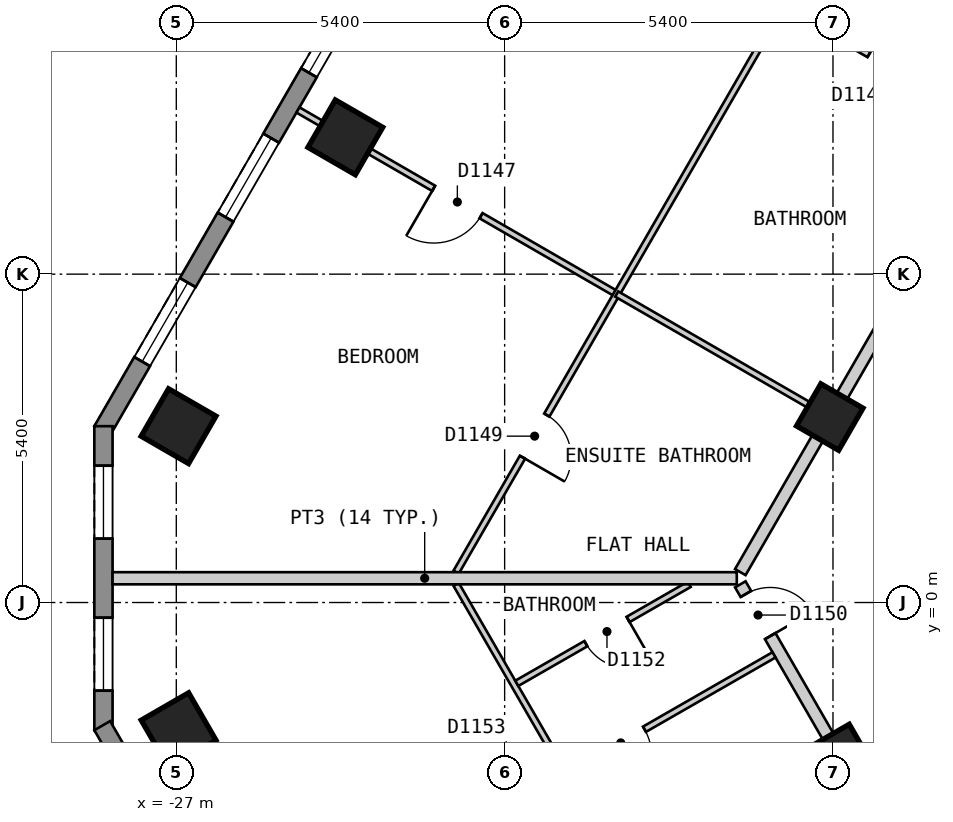
"""IFC4 building model, lengths in metres.
Left out: names, types, materials, properties, quantities, classifications, styles, units other than length and angle.
Written with IfcOpenShell. Run it as: python <this file> out.ifc"""

import sys

from ifc_helpers import new_model, si_unit, direction, frame, frame_2d, origin, origin_2d, place, context, subcontext, project, spatial, polyline, rectangle, outline, extrude, element, fill, save


model = new_model("IFC4")
c1 = context("Model", 3, precision=1e-05, world=origin(), true_north=direction((0.0, 1.0)))
c2 = subcontext(c1, "Body", "Model", "MODEL_VIEW")
j1 = project(units=[si_unit("LENGTHUNIT", "METRE"), si_unit("PLANEANGLEUNIT", "RADIAN")], contexts=[c1])
p1 = place(None, origin())
s1 = spatial("IfcSite", under=j1, at=p1, CompositionType="ELEMENT")
p2 = place(p1, origin())
s2 = spatial("IfcBuilding", under=s1, at=p2, CompositionType="ELEMENT")
p3 = place(p2, frame((0.0, 0.0, 138.6)))
s3 = spatial("IfcBuildingStorey", under=s2, at=p3, CompositionType="ELEMENT", Elevation=138.6)
for number, where, z_axis, x_axis in (
    (1, (-24.22, 7.65, 0.0), (0.0, 0.0, 1.0), (-0.5, -0.866, 0.0)),
    (2, (-26.963, 2.9, 0.0), (0.0, 0.0, 1.0), (-0.5, -0.866, 0.0)),
    (3, (-26.962, -2.1, 0.0), (0.0, 0.0, 1.0), (0.5, -0.866, 0.0)),
):
    element("IfcColumn", number, at=place(p3, frame(where, z_axis=z_axis, x_axis=x_axis)), inside=s3, PredefinedType="COLUMN", context=c2, shape_type="SweptSolid", body=[
        extrude(rectangle(XDim=0.9, YDim=0.9, at=origin_2d()), origin(), (0.0, 0.0, 1.0), 3.0),
    ])
for number, where, z_axis, x_axis in (
    (4, (-16.079, -2.549, 0.0), (0.0, 0.0, 1.0), (0.5, -0.866, 0.0)),
    (5, (-16.253, 3.05, 0.0), (0.0, 0.0, 1.0), (-0.5, -0.866, 0.0)),
):
    element("IfcColumn", number, at=place(p3, frame(where, z_axis=z_axis, x_axis=x_axis)), inside=s3, PredefinedType="COLUMN", context=c2, shape_type="SweptSolid", body=[
        extrude(rectangle(XDim=0.8, YDim=0.8, at=origin_2d()), origin(), (0.0, 0.0, 1.0), 3.0),
    ])
p4 = place(p3, frame((-16.555, 23.025, 0.0), z_axis=(0.0, 0.0, 1.0), x_axis=(-0.500020536353, -0.866013546791, 0.0)))
e6 = element("IfcWall", 6, at=p4, inside=s3, PredefinedType="SOLIDWALL", context=c2, shape_type="SweptSolid", body=[
    extrude(outline(polyline([(0.0, -0.15), (23.325, -0.15), (23.245, 0.15), (0.08, 0.15), (0.0, -0.15)])), origin(), (0.0, 0.0, 1.0), 2.7),
])
p5 = place(p4, frame((1.314, 0.0, 0.15)))
e7 = element("IfcOpeningElement", 7, at=p5, cuts=e6, PredefinedType="OPENING", context=c2, shape_type="SweptSolid", body=[
    extrude(rectangle(XDim=1.5, YDim=2.1, at=frame_2d((0.75, 1.05))), frame((0.0, 0.16, 0.0), z_axis=(0.0, -1.0, 0.0), x_axis=(1.0, 0.0, 0.0)), (0.0, 0.0, 1.0), 0.32),
])
p6 = place(p4, frame((4.056, 0.0, 0.15)))
e8 = element("IfcOpeningElement", 8, at=p6, cuts=e6, PredefinedType="OPENING", context=c2, shape_type="SweptSolid", body=[
    extrude(rectangle(XDim=1.5, YDim=2.1, at=frame_2d((0.75, 1.05))), frame((0.0, 0.16, 0.0), z_axis=(0.0, -1.0, 0.0), x_axis=(1.0, 0.0, 0.0)), (0.0, 0.0, 1.0), 0.32),
])
p7 = place(p4, frame((6.799, 0.0, 0.15)))
e9 = element("IfcOpeningElement", 9, at=p7, cuts=e6, PredefinedType="OPENING", context=c2, shape_type="SweptSolid", body=[
    extrude(rectangle(XDim=1.5, YDim=2.1, at=frame_2d((0.75, 1.05))), frame((0.0, 0.16, 0.0), z_axis=(0.0, -1.0, 0.0), x_axis=(1.0, 0.0, 0.0)), (0.0, 0.0, 1.0), 0.32),
])
p8 = place(p4, frame((9.541, 0.0, 0.15)))
e10 = element("IfcOpeningElement", 10, at=p8, cuts=e6, PredefinedType="OPENING", context=c2, shape_type="SweptSolid", body=[
    extrude(rectangle(XDim=1.5, YDim=2.1, at=frame_2d((0.75, 1.05))), frame((0.0, 0.16, 0.0), z_axis=(0.0, -1.0, 0.0), x_axis=(1.0, 0.0, 0.0)), (0.0, 0.0, 1.0), 0.32),
])
p9 = place(p4, frame((12.285, 0.0, 0.15)))
e11 = element("IfcOpeningElement", 11, at=p9, cuts=e6, PredefinedType="OPENING", context=c2, shape_type="SweptSolid", body=[
    extrude(rectangle(XDim=1.5, YDim=2.1, at=frame_2d((0.75, 1.05))), frame((0.0, 0.16, 0.0), z_axis=(0.0, -1.0, 0.0), x_axis=(1.0, 0.0, 0.0)), (0.0, 0.0, 1.0), 0.32),
])
p10 = place(p4, frame((15.027, 0.0, 0.15)))
e12 = element("IfcOpeningElement", 12, at=p10, cuts=e6, PredefinedType="OPENING", context=c2, shape_type="SweptSolid", body=[
    extrude(rectangle(XDim=1.5, YDim=2.1, at=frame_2d((0.75, 1.05))), frame((0.0, 0.16, 0.0), z_axis=(0.0, -1.0, 0.0), x_axis=(1.0, 0.0, 0.0)), (0.0, 0.0, 1.0), 0.32),
])
p11 = place(p4, frame((17.769, 0.0, 0.15)))
e13 = element("IfcOpeningElement", 13, at=p11, cuts=e6, PredefinedType="OPENING", context=c2, shape_type="SweptSolid", body=[
    extrude(rectangle(XDim=1.5, YDim=2.1, at=frame_2d((0.75, 1.05))), frame((0.0, 0.16, 0.0), z_axis=(0.0, -1.0, 0.0), x_axis=(1.0, 0.0, 0.0)), (0.0, 0.0, 1.0), 0.32),
])
p12 = place(p4, frame((20.512, 0.0, 0.15)))
e14 = element("IfcOpeningElement", 14, at=p12, cuts=e6, PredefinedType="OPENING", context=c2, shape_type="SweptSolid", body=[
    extrude(rectangle(XDim=1.5, YDim=2.1, at=frame_2d((0.75, 1.05))), frame((0.0, 0.16, 0.0), z_axis=(0.0, -1.0, 0.0), x_axis=(1.0, 0.0, 0.0)), (0.0, 0.0, 1.0), 0.32),
])
p13 = place(p3, frame((-28.198, 2.9, 0.0), z_axis=(0.0, 0.0, 1.0), x_axis=(0.0, -1.0, 0.0)))
e15 = element("IfcWall", 15, at=p13, inside=s3, PredefinedType="SOLIDWALL", context=c2, shape_type="SweptSolid", body=[
    extrude(outline(polyline([(0.0, -0.15), (5.0, -0.15), (4.92, 0.15), (0.08, 0.15), (0.0, -0.15)])), origin(), (0.0, 0.0, 1.0), 2.7),
])
p14 = place(p13, frame((0.65, 0.0, 0.15)))
e16 = element("IfcOpeningElement", 16, at=p14, cuts=e15, PredefinedType="OPENING", context=c2, shape_type="SweptSolid", body=[
    extrude(rectangle(XDim=1.2, YDim=2.1, at=frame_2d((0.6, 1.05))), frame((0.0, 0.16, 0.0), z_axis=(0.0, -1.0, 0.0), x_axis=(1.0, 0.0, 0.0)), (0.0, 0.0, 1.0), 0.32),
])
p15 = place(p13, frame((3.15, 0.0, 0.15)))
e17 = element("IfcOpeningElement", 17, at=p15, cuts=e15, PredefinedType="OPENING", context=c2, shape_type="SweptSolid", body=[
    extrude(rectangle(XDim=1.2, YDim=2.1, at=frame_2d((0.6, 1.05))), frame((0.0, 0.16, 0.0), z_axis=(0.0, -1.0, 0.0), x_axis=(1.0, 0.0, 0.0)), (0.0, 0.0, 1.0), 0.32),
])
p16 = place(p3, frame((-28.218, -2.025, 0.0), z_axis=(0.0, 0.0, 1.0), x_axis=(0.500017503135, -0.866015298109, 0.0)))
e18 = element("IfcWall", 18, at=p16, inside=s3, PredefinedType="SOLIDWALL", context=c2, shape_type="SweptSolid", body=[
    extrude(outline(polyline([(0.0, -0.15), (24.711, -0.15), (24.631, 0.15), (0.08, 0.15), (0.0, -0.15)])), origin(), (0.0, 0.0, 1.0), 2.7),
])
p17 = place(p16, frame((1.4, 0.0, 0.15)))
e19 = element("IfcOpeningElement", 19, at=p17, cuts=e18, PredefinedType="OPENING", context=c2, shape_type="SweptSolid", body=[
    extrude(rectangle(XDim=1.5, YDim=2.1, at=frame_2d((0.75, 1.05))), frame((0.0, 0.16, 0.0), z_axis=(0.0, -1.0, 0.0), x_axis=(1.0, 0.0, 0.0)), (0.0, 0.0, 1.0), 0.32),
])
p18 = place(p16, frame((4.316, 0.0, 0.15)))
e20 = element("IfcOpeningElement", 20, at=p18, cuts=e18, PredefinedType="OPENING", context=c2, shape_type="SweptSolid", body=[
    extrude(rectangle(XDim=1.5, YDim=2.1, at=frame_2d((0.75, 1.05))), frame((0.0, 0.16, 0.0), z_axis=(0.0, -1.0, 0.0), x_axis=(1.0, 0.0, 0.0)), (0.0, 0.0, 1.0), 0.32),
])
p19 = place(p16, frame((7.231, 0.0, 0.15)))
e21 = element("IfcOpeningElement", 21, at=p19, cuts=e18, PredefinedType="OPENING", context=c2, shape_type="SweptSolid", body=[
    extrude(rectangle(XDim=1.5, YDim=2.1, at=frame_2d((0.75, 1.05))), frame((0.0, 0.16, 0.0), z_axis=(0.0, -1.0, 0.0), x_axis=(1.0, 0.0, 0.0)), (0.0, 0.0, 1.0), 0.32),
])
p20 = place(p16, frame((10.147, 0.0, 0.15)))
e22 = element("IfcOpeningElement", 22, at=p20, cuts=e18, PredefinedType="OPENING", context=c2, shape_type="SweptSolid", body=[
    extrude(rectangle(XDim=1.5, YDim=2.1, at=frame_2d((0.75, 1.05))), frame((0.0, 0.16, 0.0), z_axis=(0.0, -1.0, 0.0), x_axis=(1.0, 0.0, 0.0)), (0.0, 0.0, 1.0), 0.32),
])
p21 = place(p16, frame((13.062, 0.0, 0.15)))
e23 = element("IfcOpeningElement", 23, at=p21, cuts=e18, PredefinedType="OPENING", context=c2, shape_type="SweptSolid", body=[
    extrude(rectangle(XDim=1.5, YDim=2.1, at=frame_2d((0.75, 1.05))), frame((0.0, 0.16, 0.0), z_axis=(0.0, -1.0, 0.0), x_axis=(1.0, 0.0, 0.0)), (0.0, 0.0, 1.0), 0.32),
])
p22 = place(p16, frame((15.977, 0.0, 0.15)))
e24 = element("IfcOpeningElement", 24, at=p22, cuts=e18, PredefinedType="OPENING", context=c2, shape_type="SweptSolid", body=[
    extrude(rectangle(XDim=1.5, YDim=2.1, at=frame_2d((0.75, 1.05))), frame((0.0, 0.16, 0.0), z_axis=(0.0, -1.0, 0.0), x_axis=(1.0, 0.0, 0.0)), (0.0, 0.0, 1.0), 0.32),
])
p23 = place(p16, frame((18.893, 0.0, 0.15)))
e25 = element("IfcOpeningElement", 25, at=p23, cuts=e18, PredefinedType="OPENING", context=c2, shape_type="SweptSolid", body=[
    extrude(rectangle(XDim=1.5, YDim=2.1, at=frame_2d((0.75, 1.05))), frame((0.0, 0.16, 0.0), z_axis=(0.0, -1.0, 0.0), x_axis=(1.0, 0.0, 0.0)), (0.0, 0.0, 1.0), 0.32),
])
p24 = place(p16, frame((21.809, 0.0, 0.15)))
e26 = element("IfcOpeningElement", 26, at=p24, cuts=e18, PredefinedType="OPENING", context=c2, shape_type="SweptSolid", body=[
    extrude(rectangle(XDim=1.5, YDim=2.1, at=frame_2d((0.75, 1.05))), frame((0.0, 0.16, 0.0), z_axis=(0.0, -1.0, 0.0), x_axis=(1.0, 0.0, 0.0)), (0.0, 0.0, 1.0), 0.32),
])
p25 = place(p3, frame((-17.724, 0.299, 0.0), z_axis=(0.0, 0.0, 1.0), x_axis=(0.499910220442, -0.866077231832, 0.0)))
e27 = element("IfcWall", 27, at=p25, inside=s3, PredefinedType="PARTITIONING", context=c2, shape_type="SweptSolid", body=[
    extrude(rectangle(XDim=3.189, YDim=0.2, at=frame_2d((1.594, 0.0))), origin(), (0.0, 0.0, 1.0), 2.7),
])
p26 = place(p25, frame((0.183, 0.0, 0.0)))
e28 = element("IfcOpeningElement", 28, at=p26, cuts=e27, PredefinedType="OPENING", context=c2, shape_type="SweptSolid", body=[
    extrude(rectangle(XDim=0.8, YDim=2.1, at=frame_2d((0.4, 1.05))), frame((0.0, 0.11, 0.0), z_axis=(0.0, -1.0, 0.0), x_axis=(1.0, 0.0, 0.0)), (0.0, 0.0, 1.0), 0.22),
])
p27 = place(p3, frame((-17.724, 0.5, 0.0), z_axis=(0.0, 0.0, 1.0), x_axis=(0.499992388462, 0.866029798263, 0.0)))
e29 = element("IfcWall", 29, at=p27, inside=s3, PredefinedType="PARTITIONING", context=c2, shape_type="SweptSolid", body=[
    extrude(rectangle(XDim=16.859, YDim=0.2, at=frame_2d((8.429, 0.0))), origin(), (0.0, 0.0, 1.0), 2.7),
])
p28 = place(p27, frame((10.672, 0.0, 0.0)))
e30 = element("IfcOpeningElement", 30, at=p28, cuts=e29, PredefinedType="OPENING", context=c2, shape_type="SweptSolid", body=[
    extrude(rectangle(XDim=1.0, YDim=2.1, at=frame_2d((0.5, 1.05))), frame((0.0, 0.11, 0.0), z_axis=(0.0, -1.0, 0.0), x_axis=(1.0, 0.0, 0.0)), (0.0, 0.0, 1.0), 0.22),
])
p29 = place(p3, frame((-22.398, 0.299, 0.0), z_axis=(0.0, 0.0, 1.0), x_axis=(0.50004249738, -0.86600086652, 0.0)))
e31 = element("IfcWall", 31, at=p29, inside=s3, PredefinedType="PARTITIONING", context=c2, shape_type="SweptSolid", body=[
    extrude(rectangle(XDim=3.236, YDim=0.1, at=frame_2d((1.618, 0.0))), origin(), (0.0, 0.0, 1.0), 2.7),
])
p30 = place(p3, frame((-24.999, 8.1, 0.0), z_axis=(0.0, 0.0, 1.0), x_axis=(0.865978029808, -0.500082045158, 0.0)))
e32 = element("IfcWall", 32, at=p30, inside=s3, PredefinedType="PARTITIONING", context=c2, shape_type="SweptSolid", body=[
    extrude(rectangle(XDim=6.053, YDim=0.1, at=frame_2d((3.027, 0.0))), origin(), (0.0, 0.0, 1.0), 2.7),
])
p31 = place(p30, frame((2.577, 0.0, 0.0)))
e33 = element("IfcOpeningElement", 33, at=p31, cuts=e32, PredefinedType="OPENING", context=c2, shape_type="SweptSolid", body=[
    extrude(rectangle(XDim=0.9, YDim=2.1, at=frame_2d((0.45, 1.05))), frame((0.0, 0.06, 0.0), z_axis=(0.0, -1.0, 0.0), x_axis=(1.0, 0.0, 0.0)), (0.0, 0.0, 1.0), 0.12),
])
p32 = place(p3, frame((-16.971, 9.798, 0.0), z_axis=(0.0, 0.0, 1.0), x_axis=(0.866087525071, -0.499892387336, 0.0)))
e34 = element("IfcWall", 34, at=p32, inside=s3, PredefinedType="PARTITIONING", context=c2, shape_type="SweptSolid", body=[
    extrude(rectangle(XDim=3.897, YDim=0.1, at=frame_2d((1.948, 0.0))), origin(), (0.0, 0.0, 1.0), 2.7),
])
p33 = place(p32, frame((1.574, 0.0, 0.0)))
e35 = element("IfcOpeningElement", 35, at=p33, cuts=e34, PredefinedType="OPENING", context=c2, shape_type="SweptSolid", body=[
    extrude(rectangle(XDim=0.8, YDim=2.1, at=frame_2d((0.4, 1.05))), frame((0.0, 0.06, 0.0), z_axis=(0.0, -1.0, 0.0), x_axis=(1.0, 0.0, 0.0)), (0.0, 0.0, 1.0), 0.12),
])
p34 = place(p3, frame((-22.398, 0.499, 0.0), z_axis=(0.0, 0.0, 1.0), x_axis=(0.499981561717, 0.866036048871, 0.0)))
e36 = element("IfcWall", 36, at=p34, inside=s3, PredefinedType="PARTITIONING", context=c2, shape_type="SweptSolid", body=[
    extrude(rectangle(XDim=21.532, YDim=0.1, at=frame_2d((10.766, 0.0))), origin(), (0.0, 0.0, 1.0), 2.7),
])
p35 = place(p34, frame((13.049, 0.0, 0.0)))
e37 = element("IfcOpeningElement", 37, at=p35, cuts=e36, PredefinedType="OPENING", context=c2, shape_type="SweptSolid", body=[
    extrude(rectangle(XDim=0.9, YDim=2.1, at=frame_2d((0.45, 1.05))), frame((0.0, 0.06, 0.0), z_axis=(0.0, -1.0, 0.0), x_axis=(1.0, 0.0, 0.0)), (0.0, 0.0, 1.0), 0.12),
])
p36 = place(p34, frame((2.183, 0.0, 0.0)))
e38 = element("IfcOpeningElement", 38, at=p36, cuts=e36, PredefinedType="OPENING", context=c2, shape_type="SweptSolid", body=[
    extrude(rectangle(XDim=0.8, YDim=2.1, at=frame_2d((0.4, 1.05))), frame((0.0, 0.06, 0.0), z_axis=(0.0, -1.0, 0.0), x_axis=(1.0, 0.0, 0.0)), (0.0, 0.0, 1.0), 0.12),
])
p37 = place(p3, frame((-22.247, -3.776, 0.0), z_axis=(0.0, 0.0, 1.0), x_axis=(0.867243093247, 0.497884943752, 0.0)))
e39 = element("IfcWall", 39, at=p37, inside=s3, PredefinedType="PARTITIONING", context=c2, shape_type="SweptSolid", body=[
    extrude(rectangle(XDim=5.854, YDim=0.1, at=frame_2d((2.927, 0.0))), origin(), (0.0, 0.0, 1.0), 2.7),
])
p38 = place(p37, frame((2.498, 0.0, 0.0)))
e40 = element("IfcOpeningElement", 40, at=p38, cuts=e39, PredefinedType="OPENING", context=c2, shape_type="SweptSolid", body=[
    extrude(rectangle(XDim=0.9, YDim=2.1, at=frame_2d((0.45, 1.05))), frame((0.0, 0.06, 0.0), z_axis=(0.0, -1.0, 0.0), x_axis=(1.0, 0.0, 0.0)), (0.0, 0.0, 1.0), 0.12),
])
p39 = place(p3, frame((-21.4, -1.329, 0.0), z_axis=(0.0, 0.0, 1.0), x_axis=(0.867235187435, 0.497898714274, 0.0)))
e41 = element("IfcWall", 41, at=p39, inside=s3, PredefinedType="PARTITIONING", context=c2, shape_type="SweptSolid", body=[
    extrude(rectangle(XDim=3.27, YDim=0.1, at=frame_2d((1.635, 0.0))), origin(), (0.0, 0.0, 1.0), 2.7),
])
p40 = place(p39, frame((1.31, 0.0, 0.0)))
e42 = element("IfcOpeningElement", 42, at=p40, cuts=e41, PredefinedType="OPENING", context=c2, shape_type="SweptSolid", body=[
    extrude(rectangle(XDim=0.8, YDim=2.1, at=frame_2d((0.4, 1.05))), frame((0.0, 0.06, 0.0), z_axis=(0.0, -1.0, 0.0), x_axis=(1.0, 0.0, 0.0)), (0.0, 0.0, 1.0), 0.12),
])
p41 = place(p3, frame((-28.048, 0.399, 0.0), z_axis=(0.0, 0.0, 1.0), x_axis=(1.0, 0.0, 0.0)))
e43 = element("IfcWall", 43, at=p41, inside=s3, PredefinedType="PARTITIONING", context=c2, shape_type="SweptSolid", body=[
    extrude(rectangle(XDim=10.266, YDim=0.2, at=frame_2d((5.133, 0.0))), origin(), (0.0, 0.0, 1.0), 2.7),
])
p42 = place(p3, frame((-19.757, 5.073, 0.0), z_axis=(0.0, 0.0, 1.0), x_axis=(0.866076396086, -0.499911668341, 0.0)))
e44 = element("IfcWall", 44, at=p42, inside=s3, PredefinedType="PARTITIONING", context=c2, shape_type="SweptSolid", body=[
    extrude(rectangle(XDim=3.947, YDim=0.1, at=frame_2d((1.973, 0.0))), origin(), (0.0, 0.0, 1.0), 2.7),
])
p43 = place(p10, origin())
e45 = element("IfcWindow", 45, at=p43, inside=s3, PartitioningType="SINGLE_PANEL", PredefinedType="WINDOW", context=c2, shape_type="SweptSolid", body=[
    extrude(rectangle(XDim=1.5, YDim=2.1, at=frame_2d((0.75, 1.05))), frame((0.0, 0.03, 0.0), z_axis=(0.0, -1.0, 0.0), x_axis=(1.0, 0.0, 0.0)), (0.0, 0.0, 1.0), 0.06),
])
fill(e12, e45)
p44 = place(p11, origin())
e46 = element("IfcWindow", 46, at=p44, inside=s3, PartitioningType="SINGLE_PANEL", PredefinedType="WINDOW", context=c2, shape_type="SweptSolid", body=[
    extrude(rectangle(XDim=1.5, YDim=2.1, at=frame_2d((0.75, 1.05))), frame((0.0, 0.03, 0.0), z_axis=(0.0, -1.0, 0.0), x_axis=(1.0, 0.0, 0.0)), (0.0, 0.0, 1.0), 0.06),
])
fill(e13, e46)
p45 = place(p12, origin())
e47 = element("IfcWindow", 47, at=p45, inside=s3, PartitioningType="SINGLE_PANEL", PredefinedType="WINDOW", context=c2, shape_type="SweptSolid", body=[
    extrude(rectangle(XDim=1.5, YDim=2.1, at=frame_2d((0.75, 1.05))), frame((0.0, 0.03, 0.0), z_axis=(0.0, -1.0, 0.0), x_axis=(1.0, 0.0, 0.0)), (0.0, 0.0, 1.0), 0.06),
])
fill(e14, e47)
p46 = place(p14, origin())
e48 = element("IfcWindow", 48, at=p46, inside=s3, PartitioningType="SINGLE_PANEL", PredefinedType="WINDOW", context=c2, shape_type="SweptSolid", body=[
    extrude(rectangle(XDim=1.2, YDim=2.1, at=frame_2d((0.6, 1.05))), frame((0.0, 0.03, 0.0), z_axis=(0.0, -1.0, 0.0), x_axis=(1.0, 0.0, 0.0)), (0.0, 0.0, 1.0), 0.06),
])
fill(e16, e48)
p47 = place(p15, origin())
e49 = element("IfcWindow", 49, at=p47, inside=s3, PartitioningType="SINGLE_PANEL", PredefinedType="WINDOW", context=c2, shape_type="SweptSolid", body=[
    extrude(rectangle(XDim=1.2, YDim=2.1, at=frame_2d((0.6, 1.05))), frame((0.0, 0.03, 0.0), z_axis=(0.0, -1.0, 0.0), x_axis=(1.0, 0.0, 0.0)), (0.0, 0.0, 1.0), 0.06),
])
fill(e17, e49)
p48 = place(p33, origin())
e50 = element("IfcDoor", 50, at=p48, inside=s3, OperationType="SINGLE_SWING_RIGHT", PredefinedType="DOOR", context=c2, shape_type="SweptSolid", body=[
    extrude(rectangle(XDim=0.8, YDim=2.1, at=frame_2d((0.4, 1.05))), frame((0.0, 0.025, 0.0), z_axis=(0.0, -1.0, 0.0), x_axis=(1.0, 0.0, 0.0)), (0.0, 0.0, 1.0), 0.05),
])
fill(e35, e50)
p49 = place(p31, origin())
e51 = element("IfcDoor", 51, at=p49, inside=s3, OperationType="SINGLE_SWING_LEFT", PredefinedType="DOOR", context=c2, shape_type="SweptSolid", body=[
    extrude(rectangle(XDim=0.9, YDim=2.1, at=frame_2d((0.45, 1.05))), frame((0.0, 0.025, 0.0), z_axis=(0.0, -1.0, 0.0), x_axis=(1.0, 0.0, 0.0)), (0.0, 0.0, 1.0), 0.05),
])
fill(e33, e51)
p50 = place(p36, origin())
e52 = element("IfcDoor", 52, at=p50, inside=s3, OperationType="SINGLE_SWING_LEFT", PredefinedType="DOOR", context=c2, shape_type="SweptSolid", body=[
    extrude(rectangle(XDim=0.8, YDim=2.1, at=frame_2d((0.4, 1.05))), frame((0.0, 0.025, 0.0), z_axis=(0.0, -1.0, 0.0), x_axis=(1.0, 0.0, 0.0)), (0.0, 0.0, 1.0), 0.05),
])
fill(e38, e52)
p51 = place(p26, origin())
e53 = element("IfcDoor", 53, at=p51, inside=s3, OperationType="SINGLE_SWING_RIGHT", PredefinedType="DOOR", context=c2, shape_type="SweptSolid", body=[
    extrude(rectangle(XDim=0.8, YDim=2.1, at=frame_2d((0.4, 1.05))), frame((0.0, 0.025, 0.0), z_axis=(0.0, -1.0, 0.0), x_axis=(1.0, 0.0, 0.0)), (0.0, 0.0, 1.0), 0.05),
])
fill(e28, e53)
p52 = place(p38, origin())
e54 = element("IfcDoor", 54, at=p52, inside=s3, OperationType="SINGLE_SWING_LEFT", PredefinedType="DOOR", context=c2, shape_type="SweptSolid", body=[
    extrude(rectangle(XDim=0.9, YDim=2.1, at=frame_2d((0.45, 1.05))), frame((0.0, 0.025, 0.0), z_axis=(0.0, -1.0, 0.0), x_axis=(1.0, 0.0, 0.0)), (0.0, 0.0, 1.0), 0.05),
])
fill(e40, e54)
p53 = place(p40, origin())
e55 = element("IfcDoor", 55, at=p53, inside=s3, OperationType="SINGLE_SWING_RIGHT", PredefinedType="DOOR", context=c2, shape_type="SweptSolid", body=[
    extrude(rectangle(XDim=0.8, YDim=2.1, at=frame_2d((0.4, 1.05))), frame((0.0, 0.025, 0.0), z_axis=(0.0, -1.0, 0.0), x_axis=(1.0, 0.0, 0.0)), (0.0, 0.0, 1.0), 0.05),
])
fill(e42, e55)
save(model, sys.argv[1])
